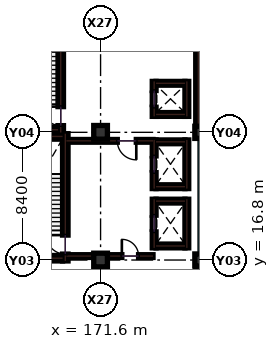
"""IFC4 building model, lengths in metres.
Left out: names, types, materials, properties, quantities, classifications, styles, units other than length and angle.
Written with IfcOpenShell. Run it as: python <this file> out.ifc"""

import sys

from ifc_helpers import new_model, si_unit, direction, frame, frame_2d, origin, origin_2d, place, context, subcontext, project, spatial, rectangle, extrude, element, fill, save


model = new_model("IFC4")
c1 = context("Model", 3, precision=1e-05, world=origin(), true_north=direction((0.0, 1.0)))
c2 = subcontext(c1, "Body", "Model", "MODEL_VIEW")
j1 = project(units=[si_unit("LENGTHUNIT", "METRE"), si_unit("PLANEANGLEUNIT", "RADIAN")], contexts=[c1])
p1 = place(None, origin())
s1 = spatial("IfcSite", under=j1, at=p1, CompositionType="ELEMENT")
p2 = place(p1, origin())
s2 = spatial("IfcBuilding", under=s1, at=p2, CompositionType="ELEMENT")
p3 = place(p2, frame((0.0, 0.0, 9.9)))
s3 = spatial("IfcBuildingStorey", under=s2, at=p3, CompositionType="ELEMENT", Elevation=9.9)
for number, where, z_axis, x_axis in (
    (1, (171.6, 16.8, 0.0), (0.0, 0.0, 1.0), (1.0, 0.0, 0.0)),
    (2, (171.6, 25.2, 0.0), (0.0, 0.0, 1.0), (1.0, 0.0, 0.0)),
):
    element("IfcColumn", number, at=place(p3, frame(where, z_axis=z_axis, x_axis=x_axis)), inside=s3, PredefinedType="COLUMN", context=c2, shape_type="SweptSolid", body=[
        extrude(rectangle(XDim=0.9, YDim=0.9, at=origin_2d()), origin(), (0.0, 0.0, 1.0), 4.5),
    ])
for number, where, z_axis, x_axis in (
    (3, (178.2, 16.8, 0.0), (0.0, 0.0, 1.0), (1.0, 0.0, 0.0)),
    (4, (178.2, 25.2, 0.0), (0.0, 0.0, 1.0), (1.0, 0.0, 0.0)),
):
    element("IfcColumn", number, at=place(p3, frame(where, z_axis=z_axis, x_axis=x_axis)), inside=s3, PredefinedType="COLUMN", context=c2, shape_type="SweptSolid", body=[
        extrude(rectangle(XDim=0.8, YDim=0.8, at=origin_2d()), origin(), (0.0, 0.0, 1.0), 4.5),
    ])
for number, where, z_axis, x_axis in (
    (5, (178.03, 8.795, 0.0), (0.0, 0.0, 1.0), (0.0, 1.0, 0.0)),
    (6, (178.03, 25.595, 0.0), (0.0, 0.0, 1.0), (0.0, 1.0, 0.0)),
):
    element("IfcWall", number, at=place(p3, frame(where, z_axis=z_axis, x_axis=x_axis)), inside=s3, PredefinedType="SHEAR", context=c2, shape_type="SweptSolid", body=[
        extrude(rectangle(XDim=7.61, YDim=0.34, at=frame_2d((3.805, 0.0))), origin(), (0.0, 0.0, 1.0), 4.24),
    ])
p4 = place(p3, frame((169.28, 16.74, 0.0), z_axis=(0.0, 0.0, 1.0), x_axis=(0.0, 1.0, 0.0)))
e7 = element("IfcWall", 7, at=p4, inside=s3, PredefinedType="SHEAR", context=c2, shape_type="SweptSolid", body=[
    extrude(rectangle(XDim=8.37, YDim=0.36, at=frame_2d((4.185, 0.0))), origin(), (0.0, 0.0, 1.0), 4.24),
])
p5 = place(p4, frame((0.45, 0.0, 0.0)))
e8 = element("IfcOpeningElement", 8, at=p5, cuts=e7, PredefinedType="OPENING", context=c2, shape_type="SweptSolid", body=[
    extrude(rectangle(XDim=1.25, YDim=2.15, at=frame_2d((0.625, 1.075))), frame((0.0, 0.19, 0.0), z_axis=(0.0, -1.0, 0.0), x_axis=(1.0, 0.0, 0.0)), (0.0, 0.0, 1.0), 0.38),
])
for number, where, z_axis, x_axis in (
    (9, (165.6, 24.93, 0.0), (0.0, 0.0, 1.0), (1.0, 0.0, 0.0)),
    (10, (165.6, 16.92, 0.0), (0.0, 0.0, 1.0), (1.0, 0.0, 0.0)),
):
    element("IfcWall", number, at=place(p3, frame(where, z_axis=z_axis, x_axis=x_axis)), inside=s3, PredefinedType="SHEAR", context=c2, shape_type="SweptSolid", body=[
        extrude(rectangle(XDim=3.5, YDim=0.36, at=frame_2d((1.75, 0.0))), origin(), (0.0, 0.0, 1.0), 4.24),
    ])
p6 = place(p3, frame((168.98, 25.19, 0.0), z_axis=(0.0, 0.0, 1.0), x_axis=(0.0, 1.0, 0.0)))
e11 = element("IfcWall", 11, at=p6, inside=s3, PredefinedType="SHEAR", context=c2, shape_type="SweptSolid", body=[
    extrude(rectangle(XDim=8.17, YDim=0.36, at=frame_2d((4.085, 0.0))), origin(), (0.0, 0.0, 1.0), 4.24),
])
p7 = place(p6, frame((0.45, 0.0, 0.0)))
e12 = element("IfcOpeningElement", 12, at=p7, cuts=e11, PredefinedType="OPENING", context=c2, shape_type="SweptSolid", body=[
    extrude(rectangle(XDim=1.25, YDim=2.15, at=frame_2d((0.625, 1.075))), frame((0.0, 0.19, 0.0), z_axis=(0.0, -1.0, 0.0), x_axis=(1.0, 0.0, 0.0)), (0.0, 0.0, 1.0), 0.38),
])
p8 = place(p3, frame((165.6, 25.37, 0.0), z_axis=(0.0, 0.0, 1.0), x_axis=(1.0, 0.0, 0.0)))
e13 = element("IfcWall", 13, at=p8, inside=s3, PredefinedType="SHEAR", context=c2, shape_type="SweptSolid", body=[
    extrude(rectangle(XDim=3.2, YDim=0.36, at=frame_2d((1.6, 0.0))), origin(), (0.0, 0.0, 1.0), 4.24),
])
p9 = place(p3, frame((175.125, 17.6, 0.0), z_axis=(0.0, 0.0, 1.0), x_axis=(0.0, 1.0, 0.0)))
e14 = element("IfcWall", 14, at=p9, inside=s3, PredefinedType="SHEAR", context=c2, shape_type="SweptSolid", body=[
    extrude(rectangle(XDim=3.2, YDim=0.25, at=frame_2d((1.6, 0.0))), origin(), (0.0, 0.0, 1.0), 4.24),
])
p10 = place(p9, frame((1.05, 0.0, 0.0)))
e15 = element("IfcOpeningElement", 15, at=p10, cuts=e14, PredefinedType="OPENING", context=c2, shape_type="SweptSolid", body=[
    extrude(rectangle(XDim=1.1, YDim=2.15, at=frame_2d((0.55, 1.075))), frame((0.0, 0.135, 0.0), z_axis=(0.0, -1.0, 0.0), x_axis=(1.0, 0.0, 0.0)), (0.0, 0.0, 1.0), 0.27),
])
p11 = place(p3, frame((177.275, 17.6, 0.0), z_axis=(0.0, 0.0, 1.0), x_axis=(0.0, 1.0, 0.0)))
e16 = element("IfcWall", 16, at=p11, inside=s3, PredefinedType="SHEAR", context=c2, shape_type="SweptSolid", body=[
    extrude(rectangle(XDim=3.2, YDim=0.25, at=frame_2d((1.6, 0.0))), origin(), (0.0, 0.0, 1.0), 4.24),
])
for number, where, z_axis, x_axis in (
    (17, (175.25, 17.725, 0.0), (0.0, 0.0, 1.0), (1.0, 0.0, 0.0)),
    (18, (175.25, 20.675, 0.0), (0.0, 0.0, 1.0), (1.0, 0.0, 0.0)),
):
    element("IfcWall", number, at=place(p3, frame(where, z_axis=z_axis, x_axis=x_axis)), inside=s3, PredefinedType="SHEAR", context=c2, shape_type="SweptSolid", body=[
        extrude(rectangle(XDim=1.9, YDim=0.25, at=frame_2d((0.95, 0.0))), origin(), (0.0, 0.0, 1.0), 4.24),
    ])
p12 = place(p3, frame((175.125, 21.5, 0.0), z_axis=(0.0, 0.0, 1.0), x_axis=(0.0, 1.0, 0.0)))
e19 = element("IfcWall", 19, at=p12, inside=s3, PredefinedType="SHEAR", context=c2, shape_type="SweptSolid", body=[
    extrude(rectangle(XDim=3.2, YDim=0.25, at=frame_2d((1.6, 0.0))), origin(), (0.0, 0.0, 1.0), 4.24),
])
p13 = place(p12, frame((1.05, 0.0, 0.0)))
e20 = element("IfcOpeningElement", 20, at=p13, cuts=e19, PredefinedType="OPENING", context=c2, shape_type="SweptSolid", body=[
    extrude(rectangle(XDim=1.1, YDim=2.15, at=frame_2d((0.55, 1.075))), frame((0.0, 0.135, 0.0), z_axis=(0.0, -1.0, 0.0), x_axis=(1.0, 0.0, 0.0)), (0.0, 0.0, 1.0), 0.27),
])
p14 = place(p3, frame((177.275, 21.5, 0.0), z_axis=(0.0, 0.0, 1.0), x_axis=(0.0, 1.0, 0.0)))
e21 = element("IfcWall", 21, at=p14, inside=s3, PredefinedType="SHEAR", context=c2, shape_type="SweptSolid", body=[
    extrude(rectangle(XDim=3.2, YDim=0.25, at=frame_2d((1.6, 0.0))), origin(), (0.0, 0.0, 1.0), 4.24),
])
for number, where, z_axis, x_axis in (
    (22, (175.25, 21.625, 0.0), (0.0, 0.0, 1.0), (1.0, 0.0, 0.0)),
    (23, (175.25, 24.575, 0.0), (0.0, 0.0, 1.0), (1.0, 0.0, 0.0)),
):
    element("IfcWall", number, at=place(p3, frame(where, z_axis=z_axis, x_axis=x_axis)), inside=s3, PredefinedType="SHEAR", context=c2, shape_type="SweptSolid", body=[
        extrude(rectangle(XDim=1.9, YDim=0.25, at=frame_2d((0.95, 0.0))), origin(), (0.0, 0.0, 1.0), 4.24),
    ])
p15 = place(p3, frame((175.125, 26.25, 0.0), z_axis=(0.0, 0.0, 1.0), x_axis=(0.0, 1.0, 0.0)))
e24 = element("IfcWall", 24, at=p15, inside=s3, PredefinedType="SHEAR", context=c2, shape_type="SweptSolid", body=[
    extrude(rectangle(XDim=2.3, YDim=0.25, at=frame_2d((1.15, 0.0))), origin(), (0.0, 0.0, 1.0), 4.24),
])
p16 = place(p15, frame((0.6, 0.0, 0.0)))
e25 = element("IfcOpeningElement", 25, at=p16, cuts=e24, PredefinedType="OPENING", context=c2, shape_type="SweptSolid", body=[
    extrude(rectangle(XDim=1.1, YDim=2.15, at=frame_2d((0.55, 1.075))), frame((0.0, 0.135, 0.0), z_axis=(0.0, -1.0, 0.0), x_axis=(1.0, 0.0, 0.0)), (0.0, 0.0, 1.0), 0.27),
])
p17 = place(p3, frame((177.275, 26.25, 0.0), z_axis=(0.0, 0.0, 1.0), x_axis=(0.0, 1.0, 0.0)))
e26 = element("IfcWall", 26, at=p17, inside=s3, PredefinedType="SHEAR", context=c2, shape_type="SweptSolid", body=[
    extrude(rectangle(XDim=2.3, YDim=0.25, at=frame_2d((1.15, 0.0))), origin(), (0.0, 0.0, 1.0), 4.24),
])
for number, where, z_axis, x_axis in (
    (27, (175.25, 26.375, 0.0), (0.0, 0.0, 1.0), (1.0, 0.0, 0.0)),
    (28, (175.25, 28.425, 0.0), (0.0, 0.0, 1.0), (1.0, 0.0, 0.0)),
):
    element("IfcWall", number, at=place(p3, frame(where, z_axis=z_axis, x_axis=x_axis)), inside=s3, PredefinedType="SHEAR", context=c2, shape_type="SweptSolid", body=[
        extrude(rectangle(XDim=1.9, YDim=0.25, at=frame_2d((0.95, 0.0))), origin(), (0.0, 0.0, 1.0), 4.24),
    ])
p18 = place(p3, frame((169.35, 24.64, 0.0), z_axis=(0.0, 0.0, 1.0), x_axis=(1.0, 0.0, 0.0)))
e29 = element("IfcWall", 29, at=p18, inside=s3, PredefinedType="SOLIDWALL", context=c2, shape_type="SweptSolid", body=[
    extrude(rectangle(XDim=5.7, YDim=0.18, at=frame_2d((2.85, 0.0))), origin(), (0.0, 0.0, 1.0), 4.24),
])
p19 = place(p18, frame((3.35, 0.0, 0.0)))
e30 = element("IfcOpeningElement", 30, at=p19, cuts=e29, PredefinedType="OPENING", context=c2, shape_type="SweptSolid", body=[
    extrude(rectangle(XDim=1.25, YDim=2.15, at=frame_2d((0.625, 1.075))), frame((0.0, 0.1, 0.0), z_axis=(0.0, -1.0, 0.0), x_axis=(1.0, 0.0, 0.0)), (0.0, 0.0, 1.0), 0.2),
])
p20 = place(p3, frame((169.35, 17.06, 0.0), z_axis=(0.0, 0.0, 1.0), x_axis=(1.0, 0.0, 0.0)))
e31 = element("IfcWall", 31, at=p20, inside=s3, PredefinedType="SOLIDWALL", context=c2, shape_type="SweptSolid", body=[
    extrude(rectangle(XDim=5.7, YDim=0.18, at=frame_2d((2.85, 0.0))), origin(), (0.0, 0.0, 1.0), 3.575),
])
p21 = place(p20, frame((3.65, 0.0, 0.0)))
e32 = element("IfcOpeningElement", 32, at=p21, cuts=e31, PredefinedType="OPENING", context=c2, shape_type="SweptSolid", body=[
    extrude(rectangle(XDim=1.1, YDim=2.15, at=frame_2d((0.55, 1.075))), frame((0.0, 0.1, 0.0), z_axis=(0.0, -1.0, 0.0), x_axis=(1.0, 0.0, 0.0)), (0.0, 0.0, 1.0), 0.2),
])
p22 = place(p5, origin())
e33 = element("IfcDoor", 33, at=p22, inside=s3, OperationType="SINGLE_SWING_RIGHT", PredefinedType="DOOR", context=c2, shape_type="SweptSolid", body=[
    extrude(rectangle(XDim=1.25, YDim=2.15, at=frame_2d((0.625, 1.075))), frame((0.0, 0.025, 0.0), z_axis=(0.0, -1.0, 0.0), x_axis=(1.0, 0.0, 0.0)), (0.0, 0.0, 1.0), 0.05),
])
fill(e8, e33)
p23 = place(p7, origin())
e34 = element("IfcDoor", 34, at=p23, inside=s3, OperationType="SINGLE_SWING_RIGHT", PredefinedType="DOOR", context=c2, shape_type="SweptSolid", body=[
    extrude(rectangle(XDim=1.25, YDim=2.15, at=frame_2d((0.625, 1.075))), frame((0.0, 0.025, 0.0), z_axis=(0.0, -1.0, 0.0), x_axis=(1.0, 0.0, 0.0)), (0.0, 0.0, 1.0), 0.05),
])
fill(e12, e34)
p24 = place(p10, origin())
e35 = element("IfcDoor", 35, at=p24, inside=s3, OperationType="SLIDING_TO_LEFT", PredefinedType="DOOR", context=c2, shape_type="SweptSolid", body=[
    extrude(rectangle(XDim=1.1, YDim=2.15, at=frame_2d((0.55, 1.075))), frame((0.0, 0.025, 0.0), z_axis=(0.0, -1.0, 0.0), x_axis=(1.0, 0.0, 0.0)), (0.0, 0.0, 1.0), 0.05),
])
fill(e15, e35)
p25 = place(p13, origin())
e36 = element("IfcDoor", 36, at=p25, inside=s3, OperationType="SLIDING_TO_LEFT", PredefinedType="DOOR", context=c2, shape_type="SweptSolid", body=[
    extrude(rectangle(XDim=1.1, YDim=2.15, at=frame_2d((0.55, 1.075))), frame((0.0, 0.025, 0.0), z_axis=(0.0, -1.0, 0.0), x_axis=(1.0, 0.0, 0.0)), (0.0, 0.0, 1.0), 0.05),
])
fill(e20, e36)
p26 = place(p16, origin())
e37 = element("IfcDoor", 37, at=p26, inside=s3, OperationType="SLIDING_TO_LEFT", PredefinedType="DOOR", context=c2, shape_type="SweptSolid", body=[
    extrude(rectangle(XDim=1.1, YDim=2.15, at=frame_2d((0.55, 1.075))), frame((0.0, 0.025, 0.0), z_axis=(0.0, -1.0, 0.0), x_axis=(1.0, 0.0, 0.0)), (0.0, 0.0, 1.0), 0.05),
])
fill(e25, e37)
p27 = place(p19, frame((1.25, 0.0, 0.0), z_axis=(0.0, 0.0, 1.0), x_axis=(-1.0, 0.0, 0.0)))
e38 = element("IfcDoor", 38, at=p27, inside=s3, OperationType="SINGLE_SWING_RIGHT", PredefinedType="DOOR", context=c2, shape_type="SweptSolid", body=[
    extrude(rectangle(XDim=1.25, YDim=2.15, at=frame_2d((0.625, 1.075))), frame((0.0, 0.025, 0.0), z_axis=(0.0, -1.0, 0.0), x_axis=(1.0, 0.0, 0.0)), (0.0, 0.0, 1.0), 0.05),
])
fill(e30, e38)
p28 = place(p21, origin())
e39 = element("IfcDoor", 39, at=p28, inside=s3, OperationType="SINGLE_SWING_LEFT", PredefinedType="DOOR", context=c2, shape_type="SweptSolid", body=[
    extrude(rectangle(XDim=1.1, YDim=2.15, at=frame_2d((0.55, 1.075))), frame((0.0, 0.025, 0.0), z_axis=(0.0, -1.0, 0.0), x_axis=(1.0, 0.0, 0.0)), (0.0, 0.0, 1.0), 0.05),
])
fill(e32, e39)
save(model, sys.argv[1])
